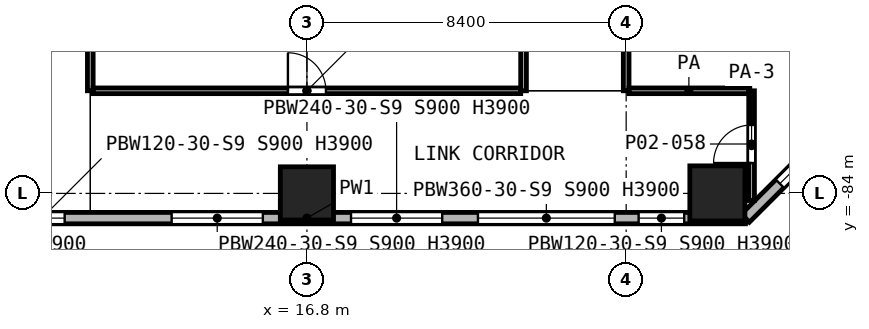
"""IFC4 building model, lengths in metres.
Left out: names, types, materials, properties, quantities, classifications, styles, units other than length and angle.
Written with IfcOpenShell. Run it as: python <this file> out.ifc"""

import sys

from ifc_helpers import new_model, si_unit, direction, frame, frame_2d, origin, origin_2d, place, context, subcontext, project, spatial, rectangle, extrude, element, fill, save


model = new_model("IFC4")
c1 = context("Model", 3, precision=1e-05, world=origin(), true_north=direction((0.0, 1.0)))
c2 = subcontext(c1, "Body", "Model", "MODEL_VIEW")
j1 = project(units=[si_unit("LENGTHUNIT", "METRE"), si_unit("PLANEANGLEUNIT", "RADIAN")], contexts=[c1])
p1 = place(None, origin())
s1 = spatial("IfcSite", under=j1, at=p1, CompositionType="ELEMENT")
p2 = place(p1, origin())
s2 = spatial("IfcBuilding", under=s1, at=p2, CompositionType="ELEMENT")
p3 = place(p2, frame((0.0, 0.0, 7.0)))
s3 = spatial("IfcBuildingStorey", under=s2, at=p3, CompositionType="ELEMENT", Elevation=7.0)
p4 = place(p3, frame((16.8, -84.0, 0.0), z_axis=(0.0, 0.0, 1.0), x_axis=(1.0, 0.0, 0.0)))
e1 = element("IfcColumn", 1, at=p4, inside=s3, PredefinedType="COLUMN", context=c2, shape_type="SweptSolid", body=[
    extrude(rectangle(XDim=1.4, YDim=1.4, at=origin_2d()), origin(), (0.0, 0.0, 1.0), 5.6),
])
p5 = place(p3, frame((27.6, -84.0, 0.0), z_axis=(0.0, 0.0, 1.0), x_axis=(1.0, 0.0, 0.0)))
e2 = element("IfcColumn", 2, at=p5, inside=s3, PredefinedType="COLUMN", context=c2, shape_type="SweptSolid", body=[
    extrude(rectangle(XDim=1.45, YDim=1.45, at=origin_2d()), origin(), (0.0, 0.0, 1.0), 5.6),
])
p6 = place(p3, frame((5.262, -84.65, 0.0), z_axis=(0.0, 0.0, 1.0), x_axis=(1.0, 0.0, 0.0)))
e3 = element("IfcWall", 3, at=p6, inside=s3, PredefinedType="SOLIDWALL", context=c2, shape_type="SweptSolid", body=[
    extrude(rectangle(XDim=23.076, YDim=0.3, at=frame_2d((11.538, 0.0))), origin(), (0.0, 0.0, 1.0), 5.25),
])
p7 = place(p6, frame((1.61, 0.0, 0.9)))
e4 = element("IfcOpeningElement", 4, at=p7, cuts=e3, PredefinedType="OPENING", context=c2, shape_type="SweptSolid", body=[
    extrude(rectangle(XDim=1.2, YDim=3.0, at=frame_2d((0.6, 1.5))), frame((0.0, 0.16, 0.0), z_axis=(0.0, -1.0, 0.0), x_axis=(1.0, 0.0, 0.0)), (0.0, 0.0, 1.0), 0.32),
])
p8 = place(p6, frame((3.963, 0.0, 0.9)))
e5 = element("IfcOpeningElement", 5, at=p8, cuts=e3, PredefinedType="OPENING", context=c2, shape_type="SweptSolid", body=[
    extrude(rectangle(XDim=1.2, YDim=3.0, at=frame_2d((0.6, 1.5))), frame((0.0, 0.16, 0.0), z_axis=(0.0, -1.0, 0.0), x_axis=(1.0, 0.0, 0.0)), (0.0, 0.0, 1.0), 0.32),
])
p9 = place(p6, frame((7.978, 0.0, 0.9)))
e6 = element("IfcOpeningElement", 6, at=p9, cuts=e3, PredefinedType="OPENING", context=c2, shape_type="SweptSolid", body=[
    extrude(rectangle(XDim=2.4, YDim=3.0, at=frame_2d((1.2, 1.5))), frame((0.0, 0.16, 0.0), z_axis=(0.0, -1.0, 0.0), x_axis=(1.0, 0.0, 0.0)), (0.0, 0.0, 1.0), 0.32),
])
p10 = place(p6, frame((12.698, 0.0, 0.9)))
e7 = element("IfcOpeningElement", 7, at=p10, cuts=e3, PredefinedType="OPENING", context=c2, shape_type="SweptSolid", body=[
    extrude(rectangle(XDim=2.4, YDim=3.0, at=frame_2d((1.2, 1.5))), frame((0.0, 0.16, 0.0), z_axis=(0.0, -1.0, 0.0), x_axis=(1.0, 0.0, 0.0)), (0.0, 0.0, 1.0), 0.32),
])
p11 = place(p6, frame((16.038, 0.0, 0.9)))
e8 = element("IfcOpeningElement", 8, at=p11, cuts=e3, PredefinedType="OPENING", context=c2, shape_type="SweptSolid", body=[
    extrude(rectangle(XDim=3.6, YDim=3.0, at=frame_2d((1.8, 1.5))), frame((0.0, 0.16, 0.0), z_axis=(0.0, -1.0, 0.0), x_axis=(1.0, 0.0, 0.0)), (0.0, 0.0, 1.0), 0.32),
])
p12 = place(p6, frame((20.265, 0.0, 0.9)))
e9 = element("IfcOpeningElement", 9, at=p12, cuts=e3, PredefinedType="OPENING", context=c2, shape_type="SweptSolid", body=[
    extrude(rectangle(XDim=1.2, YDim=3.0, at=frame_2d((0.6, 1.5))), frame((0.0, 0.16, 0.0), z_axis=(0.0, -1.0, 0.0), x_axis=(1.0, 0.0, 0.0)), (0.0, 0.0, 1.0), 0.32),
])
p13 = place(p3, frame((28.338, -84.65, 0.0), z_axis=(0.0, 0.0, 1.0), x_axis=(0.707106781187, 0.707106781187, 0.0)))
e10 = element("IfcWall", 10, at=p13, inside=s3, PredefinedType="SOLIDWALL", context=c2, shape_type="SweptSolid", body=[
    extrude(rectangle(XDim=8.361, YDim=0.3, at=frame_2d((4.181, 0.0))), origin(), (0.0, 0.0, 1.0), 5.25),
])
p14 = place(p13, frame((1.282, 0.0, 0.9)))
e11 = element("IfcOpeningElement", 11, at=p14, cuts=e10, PredefinedType="OPENING", context=c2, shape_type="SweptSolid", body=[
    extrude(rectangle(XDim=2.4, YDim=3.0, at=frame_2d((1.2, 1.5))), frame((0.0, 0.16, 0.0), z_axis=(0.0, -1.0, 0.0), x_axis=(1.0, 0.0, 0.0)), (0.0, 0.0, 1.0), 0.32),
])
p15 = place(p13, frame((4.77, 0.0, 0.9)))
e12 = element("IfcOpeningElement", 12, at=p15, cuts=e10, PredefinedType="OPENING", context=c2, shape_type="SweptSolid", body=[
    extrude(rectangle(XDim=1.2, YDim=3.0, at=frame_2d((0.6, 1.5))), frame((0.0, 0.16, 0.0), z_axis=(0.0, -1.0, 0.0), x_axis=(1.0, 0.0, 0.0)), (0.0, 0.0, 1.0), 0.32),
])
p16 = place(p3, frame((11.175, -81.3, 0.0), z_axis=(0.0, 0.0, 1.0), x_axis=(1.0, 0.0, 0.0)))
e13 = element("IfcWall", 13, at=p16, inside=s3, PredefinedType="PARTITIONING", context=c2, shape_type="SweptSolid", body=[
    extrude(rectangle(XDim=11.25, YDim=0.15, at=frame_2d((5.625, 0.0))), origin(), (0.0, 0.0, 1.0), 5.25),
])
p17 = place(p16, frame((5.125, 0.0, 0.0)))
e14 = element("IfcOpeningElement", 14, at=p17, cuts=e13, PredefinedType="OPENING", context=c2, shape_type="SweptSolid", body=[
    extrude(rectangle(XDim=1.0, YDim=2.1, at=frame_2d((0.5, 1.05))), frame((0.0, 0.085, 0.0), z_axis=(0.0, -1.0, 0.0), x_axis=(1.0, 0.0, 0.0)), (0.0, 0.0, 1.0), 0.17),
])
p18 = place(p3, frame((25.275, -81.3, 0.0), z_axis=(0.0, 0.0, 1.0), x_axis=(1.0, 0.0, 0.0)))
e15 = element("IfcWall", 15, at=p18, inside=s3, PredefinedType="PARTITIONING", context=c2, shape_type="SweptSolid", body=[
    extrude(rectangle(XDim=3.15, YDim=0.15, at=frame_2d((1.575, 0.0))), origin(), (0.0, 0.0, 1.0), 5.25),
])
p19 = place(p3, frame((11.1, -81.3, 0.0), z_axis=(0.0, 0.0, 1.0), x_axis=(0.0, 1.0, 0.0)))
e16 = element("IfcWall", 16, at=p19, inside=s3, PredefinedType="PARTITIONING", context=c2, shape_type="SweptSolid", body=[
    extrude(rectangle(XDim=51.9, YDim=0.15, at=frame_2d((25.95, 0.0))), origin(), (0.0, 0.0, 1.0), 5.25),
])
p20 = place(p19, frame((35.75, 0.0, 0.0)))
e17 = element("IfcOpeningElement", 17, at=p20, cuts=e16, PredefinedType="OPENING", context=c2, shape_type="SweptSolid", body=[
    extrude(rectangle(XDim=1.5, YDim=2.1, at=frame_2d((0.75, 1.05))), frame((0.0, 0.085, 0.0), z_axis=(0.0, -1.0, 0.0), x_axis=(1.0, 0.0, 0.0)), (0.0, 0.0, 1.0), 0.17),
])
p21 = place(p19, frame((32.95, 0.0, 0.0)))
e18 = element("IfcOpeningElement", 18, at=p21, cuts=e16, PredefinedType="OPENING", context=c2, shape_type="SweptSolid", body=[
    extrude(rectangle(XDim=1.5, YDim=2.1, at=frame_2d((0.75, 1.05))), frame((0.0, 0.085, 0.0), z_axis=(0.0, -1.0, 0.0), x_axis=(1.0, 0.0, 0.0)), (0.0, 0.0, 1.0), 0.17),
])
p22 = place(p19, frame((27.35, 0.0, 0.0)))
e19 = element("IfcOpeningElement", 19, at=p22, cuts=e16, PredefinedType="OPENING", context=c2, shape_type="SweptSolid", body=[
    extrude(rectangle(XDim=1.5, YDim=2.1, at=frame_2d((0.75, 1.05))), frame((0.0, 0.085, 0.0), z_axis=(0.0, -1.0, 0.0), x_axis=(1.0, 0.0, 0.0)), (0.0, 0.0, 1.0), 0.17),
])
p23 = place(p19, frame((24.55, 0.0, 0.0)))
e20 = element("IfcOpeningElement", 20, at=p23, cuts=e16, PredefinedType="OPENING", context=c2, shape_type="SweptSolid", body=[
    extrude(rectangle(XDim=1.5, YDim=2.1, at=frame_2d((0.75, 1.05))), frame((0.0, 0.085, 0.0), z_axis=(0.0, -1.0, 0.0), x_axis=(1.0, 0.0, 0.0)), (0.0, 0.0, 1.0), 0.17),
])
p24 = place(p19, frame((10.55, 0.0, 0.0)))
e21 = element("IfcOpeningElement", 21, at=p24, cuts=e16, PredefinedType="OPENING", context=c2, shape_type="SweptSolid", body=[
    extrude(rectangle(XDim=1.5, YDim=2.1, at=frame_2d((0.75, 1.05))), frame((0.0, 0.085, 0.0), z_axis=(0.0, -1.0, 0.0), x_axis=(1.0, 0.0, 0.0)), (0.0, 0.0, 1.0), 0.17),
])
p25 = place(p19, frame((7.75, 0.0, 0.0)))
e22 = element("IfcOpeningElement", 22, at=p25, cuts=e16, PredefinedType="OPENING", context=c2, shape_type="SweptSolid", body=[
    extrude(rectangle(XDim=1.5, YDim=2.1, at=frame_2d((0.75, 1.05))), frame((0.0, 0.085, 0.0), z_axis=(0.0, -1.0, 0.0), x_axis=(1.0, 0.0, 0.0)), (0.0, 0.0, 1.0), 0.17),
])
p26 = place(p3, frame((22.5, -81.3, 0.0), z_axis=(0.0, 0.0, 1.0), x_axis=(0.0, 1.0, 0.0)))
e23 = element("IfcWall", 23, at=p26, inside=s3, PredefinedType="PARTITIONING", context=c2, shape_type="SweptSolid", body=[
    extrude(rectangle(XDim=56.1, YDim=0.15, at=frame_2d((28.05, 0.0))), origin(), (0.0, 0.0, 1.0), 5.25),
])
p27 = place(p26, frame((49.75, 0.0, 0.0)))
e24 = element("IfcOpeningElement", 24, at=p27, cuts=e23, PredefinedType="OPENING", context=c2, shape_type="SweptSolid", body=[
    extrude(rectangle(XDim=1.5, YDim=2.1, at=frame_2d((0.75, 1.05))), frame((0.0, 0.085, 0.0), z_axis=(0.0, -1.0, 0.0), x_axis=(1.0, 0.0, 0.0)), (0.0, 0.0, 1.0), 0.17),
])
p28 = place(p26, frame((52.55, 0.0, 0.0)))
e25 = element("IfcOpeningElement", 25, at=p28, cuts=e23, PredefinedType="OPENING", context=c2, shape_type="SweptSolid", body=[
    extrude(rectangle(XDim=1.5, YDim=2.1, at=frame_2d((0.75, 1.05))), frame((0.0, 0.085, 0.0), z_axis=(0.0, -1.0, 0.0), x_axis=(1.0, 0.0, 0.0)), (0.0, 0.0, 1.0), 0.17),
])
p29 = place(p26, frame((41.35, 0.0, 0.0)))
e26 = element("IfcOpeningElement", 26, at=p29, cuts=e23, PredefinedType="OPENING", context=c2, shape_type="SweptSolid", body=[
    extrude(rectangle(XDim=1.5, YDim=2.1, at=frame_2d((0.75, 1.05))), frame((0.0, 0.085, 0.0), z_axis=(0.0, -1.0, 0.0), x_axis=(1.0, 0.0, 0.0)), (0.0, 0.0, 1.0), 0.17),
])
p30 = place(p26, frame((44.15, 0.0, 0.0)))
e27 = element("IfcOpeningElement", 27, at=p30, cuts=e23, PredefinedType="OPENING", context=c2, shape_type="SweptSolid", body=[
    extrude(rectangle(XDim=1.5, YDim=2.1, at=frame_2d((0.75, 1.05))), frame((0.0, 0.085, 0.0), z_axis=(0.0, -1.0, 0.0), x_axis=(1.0, 0.0, 0.0)), (0.0, 0.0, 1.0), 0.17),
])
p31 = place(p26, frame((16.15, 0.0, 0.0)))
e28 = element("IfcOpeningElement", 28, at=p31, cuts=e23, PredefinedType="OPENING", context=c2, shape_type="SweptSolid", body=[
    extrude(rectangle(XDim=1.5, YDim=2.1, at=frame_2d((0.75, 1.05))), frame((0.0, 0.085, 0.0), z_axis=(0.0, -1.0, 0.0), x_axis=(1.0, 0.0, 0.0)), (0.0, 0.0, 1.0), 0.17),
])
p32 = place(p26, frame((18.95, 0.0, 0.0)))
e29 = element("IfcOpeningElement", 29, at=p32, cuts=e23, PredefinedType="OPENING", context=c2, shape_type="SweptSolid", body=[
    extrude(rectangle(XDim=1.5, YDim=2.1, at=frame_2d((0.75, 1.05))), frame((0.0, 0.085, 0.0), z_axis=(0.0, -1.0, 0.0), x_axis=(1.0, 0.0, 0.0)), (0.0, 0.0, 1.0), 0.17),
])
p33 = place(p3, frame((25.2, -81.3, 0.0), z_axis=(0.0, 0.0, 1.0), x_axis=(0.0, 1.0, 0.0)))
e30 = element("IfcWall", 30, at=p33, inside=s3, PredefinedType="PARTITIONING", context=c2, shape_type="SweptSolid", body=[
    extrude(rectangle(XDim=46.95, YDim=0.15, at=frame_2d((23.475, 0.0))), origin(), (0.0, 0.0, 1.0), 5.25),
])
p34 = place(p33, frame((35.55, 0.0, 0.0)))
e31 = element("IfcOpeningElement", 31, at=p34, cuts=e30, PredefinedType="OPENING", context=c2, shape_type="SweptSolid", body=[
    extrude(rectangle(XDim=1.5, YDim=2.1, at=frame_2d((0.75, 1.05))), frame((0.0, 0.085, 0.0), z_axis=(0.0, -1.0, 0.0), x_axis=(1.0, 0.0, 0.0)), (0.0, 0.0, 1.0), 0.17),
])
p35 = place(p33, frame((26.2, 0.0, 0.0)))
e32 = element("IfcOpeningElement", 32, at=p35, cuts=e30, PredefinedType="OPENING", context=c2, shape_type="SweptSolid", body=[
    extrude(rectangle(XDim=1.0, YDim=2.1, at=frame_2d((0.5, 1.05))), frame((0.0, 0.085, 0.0), z_axis=(0.0, -1.0, 0.0), x_axis=(1.0, 0.0, 0.0)), (0.0, 0.0, 1.0), 0.17),
])
p36 = place(p33, frame((19.75, 0.0, 0.0)))
e33 = element("IfcOpeningElement", 33, at=p36, cuts=e30, PredefinedType="OPENING", context=c2, shape_type="SweptSolid", body=[
    extrude(rectangle(XDim=1.0, YDim=2.1, at=frame_2d((0.5, 1.05))), frame((0.0, 0.085, 0.0), z_axis=(0.0, -1.0, 0.0), x_axis=(1.0, 0.0, 0.0)), (0.0, 0.0, 1.0), 0.17),
])
p37 = place(p33, frame((15.55, 0.0, 0.0)))
e34 = element("IfcOpeningElement", 34, at=p37, cuts=e30, PredefinedType="OPENING", context=c2, shape_type="SweptSolid", body=[
    extrude(rectangle(XDim=1.0, YDim=2.1, at=frame_2d((0.5, 1.05))), frame((0.0, 0.085, 0.0), z_axis=(0.0, -1.0, 0.0), x_axis=(1.0, 0.0, 0.0)), (0.0, 0.0, 1.0), 0.17),
])
p38 = place(p33, frame((11.8, 0.0, 0.0)))
e35 = element("IfcOpeningElement", 35, at=p38, cuts=e30, PredefinedType="OPENING", context=c2, shape_type="SweptSolid", body=[
    extrude(rectangle(XDim=1.0, YDim=2.1, at=frame_2d((0.5, 1.05))), frame((0.0, 0.085, 0.0), z_axis=(0.0, -1.0, 0.0), x_axis=(1.0, 0.0, 0.0)), (0.0, 0.0, 1.0), 0.17),
])
p39 = place(p33, frame((6.5, 0.0, 0.0)))
e36 = element("IfcOpeningElement", 36, at=p39, cuts=e30, PredefinedType="OPENING", context=c2, shape_type="SweptSolid", body=[
    extrude(rectangle(XDim=1.0, YDim=2.1, at=frame_2d((0.5, 1.05))), frame((0.0, 0.085, 0.0), z_axis=(0.0, -1.0, 0.0), x_axis=(1.0, 0.0, 0.0)), (0.0, 0.0, 1.0), 0.17),
])
p40 = place(p3, frame((28.5, -84.187, 0.0), z_axis=(0.0, 0.0, 1.0), x_axis=(0.0, 1.0, 0.0)))
e37 = element("IfcWall", 37, at=p40, inside=s3, PredefinedType="PARTITIONING", context=c2, shape_type="SweptSolid", body=[
    extrude(rectangle(XDim=2.887, YDim=0.15, at=frame_2d((1.443, 0.0))), origin(), (0.0, 0.0, 1.0), 3.85),
])
p41 = place(p40, frame((0.987, 0.0, 0.0)))
e38 = element("IfcOpeningElement", 38, at=p41, cuts=e37, PredefinedType="OPENING", context=c2, shape_type="SweptSolid", body=[
    extrude(rectangle(XDim=1.0, YDim=2.1, at=frame_2d((0.5, 1.05))), frame((0.0, 0.085, 0.0), z_axis=(0.0, -1.0, 0.0), x_axis=(1.0, 0.0, 0.0)), (0.0, 0.0, 1.0), 0.17),
])
p42 = place(p8, origin())
e39 = element("IfcWindow", 39, at=p42, inside=s3, PartitioningType="SINGLE_PANEL", PredefinedType="WINDOW", context=c2, shape_type="SweptSolid", body=[
    extrude(rectangle(XDim=1.2, YDim=3.0, at=frame_2d((0.6, 1.5))), frame((0.0, 0.03, 0.0), z_axis=(0.0, -1.0, 0.0), x_axis=(1.0, 0.0, 0.0)), (0.0, 0.0, 1.0), 0.06),
])
fill(e5, e39)
p43 = place(p9, origin())
e40 = element("IfcWindow", 40, at=p43, inside=s3, PartitioningType="SINGLE_PANEL", PredefinedType="WINDOW", context=c2, shape_type="SweptSolid", body=[
    extrude(rectangle(XDim=2.4, YDim=3.0, at=frame_2d((1.2, 1.5))), frame((0.0, 0.03, 0.0), z_axis=(0.0, -1.0, 0.0), x_axis=(1.0, 0.0, 0.0)), (0.0, 0.0, 1.0), 0.06),
])
fill(e6, e40)
p44 = place(p10, origin())
e41 = element("IfcWindow", 41, at=p44, inside=s3, PartitioningType="SINGLE_PANEL", PredefinedType="WINDOW", context=c2, shape_type="SweptSolid", body=[
    extrude(rectangle(XDim=2.4, YDim=3.0, at=frame_2d((1.2, 1.5))), frame((0.0, 0.03, 0.0), z_axis=(0.0, -1.0, 0.0), x_axis=(1.0, 0.0, 0.0)), (0.0, 0.0, 1.0), 0.06),
])
fill(e7, e41)
p45 = place(p11, origin())
e42 = element("IfcWindow", 42, at=p45, inside=s3, PartitioningType="SINGLE_PANEL", PredefinedType="WINDOW", context=c2, shape_type="SweptSolid", body=[
    extrude(rectangle(XDim=3.6, YDim=3.0, at=frame_2d((1.8, 1.5))), frame((0.0, 0.03, 0.0), z_axis=(0.0, -1.0, 0.0), x_axis=(1.0, 0.0, 0.0)), (0.0, 0.0, 1.0), 0.06),
])
fill(e8, e42)
p46 = place(p12, origin())
e43 = element("IfcWindow", 43, at=p46, inside=s3, PartitioningType="SINGLE_PANEL", PredefinedType="WINDOW", context=c2, shape_type="SweptSolid", body=[
    extrude(rectangle(XDim=1.2, YDim=3.0, at=frame_2d((0.6, 1.5))), frame((0.0, 0.03, 0.0), z_axis=(0.0, -1.0, 0.0), x_axis=(1.0, 0.0, 0.0)), (0.0, 0.0, 1.0), 0.06),
])
fill(e9, e43)
p47 = place(p14, origin())
e44 = element("IfcWindow", 44, at=p47, inside=s3, PartitioningType="SINGLE_PANEL", PredefinedType="WINDOW", context=c2, shape_type="SweptSolid", body=[
    extrude(rectangle(XDim=2.4, YDim=3.0, at=frame_2d((1.2, 1.5))), frame((0.0, 0.03, 0.0), z_axis=(0.0, -1.0, 0.0), x_axis=(1.0, 0.0, 0.0)), (0.0, 0.0, 1.0), 0.06),
])
fill(e11, e44)
p48 = place(p17, origin())
e45 = element("IfcDoor", 45, at=p48, inside=s3, OperationType="SINGLE_SWING_LEFT", PredefinedType="DOOR", context=c2, shape_type="SweptSolid", body=[
    extrude(rectangle(XDim=1.0, YDim=2.1, at=frame_2d((0.5, 1.05))), frame((0.0, 0.025, 0.0), z_axis=(0.0, -1.0, 0.0), x_axis=(1.0, 0.0, 0.0)), (0.0, 0.0, 1.0), 0.05),
])
fill(e14, e45)
p49 = place(p41, origin())
e46 = element("IfcDoor", 46, at=p49, inside=s3, OperationType="SINGLE_SWING_LEFT", PredefinedType="DOOR", context=c2, shape_type="SweptSolid", body=[
    extrude(rectangle(XDim=1.0, YDim=2.1, at=frame_2d((0.5, 1.05))), frame((0.0, 0.025, 0.0), z_axis=(0.0, -1.0, 0.0), x_axis=(1.0, 0.0, 0.0)), (0.0, 0.0, 1.0), 0.05),
])
fill(e38, e46)
save(model, sys.argv[1])
